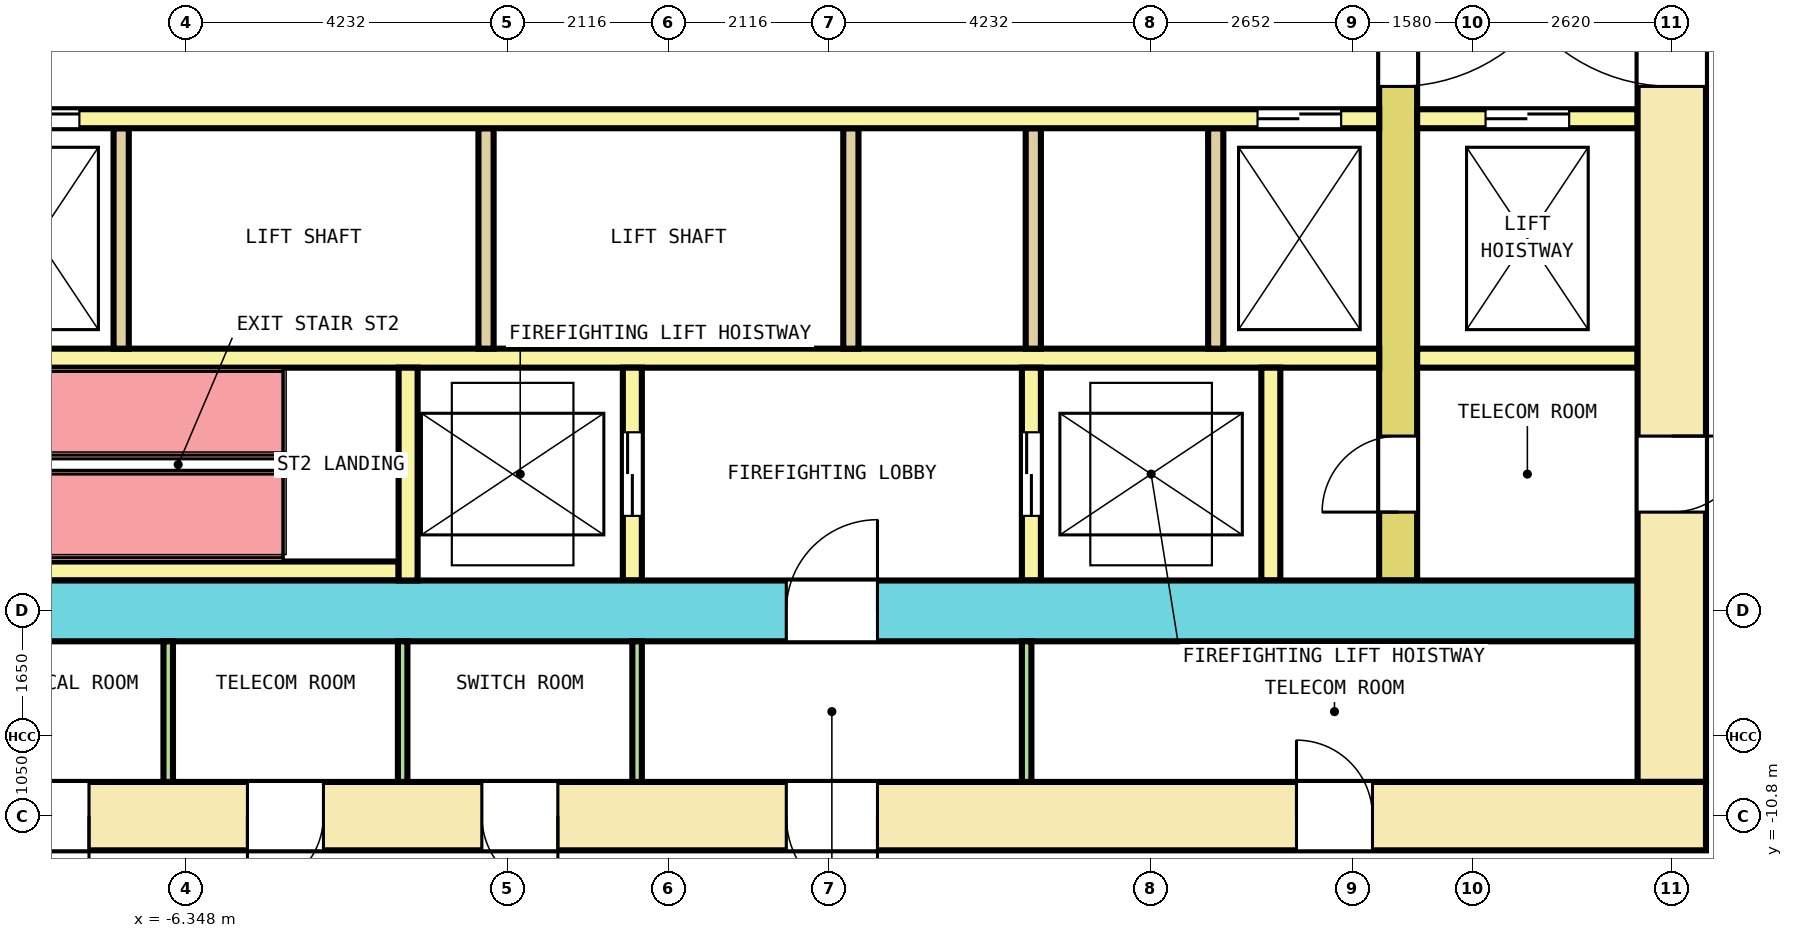
"""IFC4 building model, lengths in metres.
Left out: names, types, materials, properties, quantities, classifications, styles, units other than length and angle.
Written with IfcOpenShell. Run it as: python <this file> out.ifc"""

import sys

from ifc_helpers import new_model, si_unit, direction, frame, frame_2d, origin, place, context, subcontext, project, spatial, rectangle, extrude, element, fill, save


model = new_model("IFC4")
c1 = context("Model", 3, precision=1e-05, world=origin(), true_north=direction((0.0, 1.0)))
c2 = subcontext(c1, "Body", "Model", "MODEL_VIEW")
j1 = project(units=[si_unit("LENGTHUNIT", "METRE"), si_unit("PLANEANGLEUNIT", "RADIAN")], contexts=[c1])
p1 = place(None, origin())
s1 = spatial("IfcSite", under=j1, at=p1, CompositionType="ELEMENT")
p2 = place(p1, origin())
s2 = spatial("IfcBuilding", under=s1, at=p2, CompositionType="ELEMENT")
p3 = place(p2, frame((0.0, 0.0, 45.4)))
s3 = spatial("IfcBuildingStorey", under=s2, at=p3, CompositionType="ELEMENT", Elevation=45.4)
p4 = place(p3, frame((-13.65, -10.8, 0.0), z_axis=(0.0, 0.0, 1.0), x_axis=(1.0, 0.0, 0.0)))
e1 = element("IfcWall", 1, at=p4, inside=s3, PredefinedType="SHEAR", context=c2, shape_type="SweptSolid", body=[
    extrude(rectangle(XDim=27.3, YDim=0.9, at=frame_2d((13.65, 0.0))), origin(), (0.0, 0.0, 1.0), 4.1),
])
p5 = place(p4, frame((1.911, 0.0, 0.0)))
e2 = element("IfcOpeningElement", 2, at=p5, cuts=e1, PredefinedType="OPENING", context=c2, shape_type="SweptSolid", body=[
    extrude(rectangle(XDim=1.0, YDim=2.1, at=frame_2d((0.5, 1.05))), frame((0.0, 0.46, 0.0), z_axis=(0.0, -1.0, 0.0), x_axis=(1.0, 0.0, 0.0)), (0.0, 0.0, 1.0), 0.92),
])
p6 = place(p4, frame((5.027, 0.0, 0.0)))
e3 = element("IfcOpeningElement", 3, at=p6, cuts=e1, PredefinedType="OPENING", context=c2, shape_type="SweptSolid", body=[
    extrude(rectangle(XDim=1.0, YDim=2.1, at=frame_2d((0.5, 1.05))), frame((0.0, 0.46, 0.0), z_axis=(0.0, -1.0, 0.0), x_axis=(1.0, 0.0, 0.0)), (0.0, 0.0, 1.0), 0.92),
])
p7 = place(p4, frame((8.111, 0.0, 0.0)))
e4 = element("IfcOpeningElement", 4, at=p7, cuts=e1, PredefinedType="OPENING", context=c2, shape_type="SweptSolid", body=[
    extrude(rectangle(XDim=1.0, YDim=2.1, at=frame_2d((0.5, 1.05))), frame((0.0, 0.46, 0.0), z_axis=(0.0, -1.0, 0.0), x_axis=(1.0, 0.0, 0.0)), (0.0, 0.0, 1.0), 0.92),
])
p8 = place(p4, frame((11.195, 0.0, 0.0)))
e5 = element("IfcOpeningElement", 5, at=p8, cuts=e1, PredefinedType="OPENING", context=c2, shape_type="SweptSolid", body=[
    extrude(rectangle(XDim=1.0, YDim=2.1, at=frame_2d((0.5, 1.05))), frame((0.0, 0.46, 0.0), z_axis=(0.0, -1.0, 0.0), x_axis=(1.0, 0.0, 0.0)), (0.0, 0.0, 1.0), 0.92),
])
p9 = place(p4, frame((21.913, 0.0, 0.0)))
e6 = element("IfcOpeningElement", 6, at=p9, cuts=e1, PredefinedType="OPENING", context=c2, shape_type="SweptSolid", body=[
    extrude(rectangle(XDim=1.0, YDim=2.1, at=frame_2d((0.5, 1.05))), frame((0.0, 0.46, 0.0), z_axis=(0.0, -1.0, 0.0), x_axis=(1.0, 0.0, 0.0)), (0.0, 0.0, 1.0), 0.92),
])
p10 = place(p4, frame((15.2, 0.0, 0.0)))
e7 = element("IfcOpeningElement", 7, at=p10, cuts=e1, PredefinedType="OPENING", context=c2, shape_type="SweptSolid", body=[
    extrude(rectangle(XDim=1.2, YDim=2.1, at=frame_2d((0.6, 1.05))), frame((0.0, 0.46, 0.0), z_axis=(0.0, -1.0, 0.0), x_axis=(1.0, 0.0, 0.0)), (0.0, 0.0, 1.0), 0.92),
])
p11 = place(p3, frame((13.2, -10.35, 0.0), z_axis=(0.0, 0.0, 1.0), x_axis=(0.0, 1.0, 0.0)))
e8 = element("IfcWall", 8, at=p11, inside=s3, PredefinedType="SHEAR", context=c2, shape_type="SweptSolid", body=[
    extrude(rectangle(XDim=20.7, YDim=0.9, at=frame_2d((10.35, 0.0))), origin(), (0.0, 0.0, 1.0), 4.1),
])
p12 = place(p11, frame((9.15, 0.0, 0.0)))
e9 = element("IfcOpeningElement", 9, at=p12, cuts=e8, PredefinedType="OPENING", context=c2, shape_type="SweptSolid", body=[
    extrude(rectangle(XDim=2.4, YDim=2.1, at=frame_2d((1.2, 1.05))), frame((0.0, 0.46, 0.0), z_axis=(0.0, -1.0, 0.0), x_axis=(1.0, 0.0, 0.0)), (0.0, 0.0, 1.0), 0.92),
])
p13 = place(p11, frame((16.05, 0.0, 0.0)))
e10 = element("IfcOpeningElement", 10, at=p13, cuts=e8, PredefinedType="OPENING", context=c2, shape_type="SweptSolid", body=[
    extrude(rectangle(XDim=1.2, YDim=2.1, at=frame_2d((0.6, 1.05))), frame((0.0, 0.46, 0.0), z_axis=(0.0, -1.0, 0.0), x_axis=(1.0, 0.0, 0.0)), (0.0, 0.0, 1.0), 0.92),
])
p14 = place(p11, frame((3.55, 0.0, 0.0)))
e11 = element("IfcOpeningElement", 11, at=p14, cuts=e8, PredefinedType="OPENING", context=c2, shape_type="SweptSolid", body=[
    extrude(rectangle(XDim=1.0, YDim=2.1, at=frame_2d((0.5, 1.05))), frame((0.0, 0.46, 0.0), z_axis=(0.0, -1.0, 0.0), x_axis=(1.0, 0.0, 0.0)), (0.0, 0.0, 1.0), 0.92),
])
p15 = place(p3, frame((-12.75, -8.1, 0.0), z_axis=(0.0, 0.0, 1.0), x_axis=(1.0, 0.0, 0.0)))
e12 = element("IfcWall", 12, at=p15, inside=s3, PredefinedType="SHEAR", context=c2, shape_type="SweptSolid", body=[
    extrude(rectangle(XDim=25.5, YDim=0.8, at=frame_2d((12.75, 0.0))), origin(), (0.0, 0.0, 1.0), 4.1),
])
p16 = place(p15, frame((14.3, 0.0, 0.0)))
e13 = element("IfcOpeningElement", 13, at=p16, cuts=e12, PredefinedType="OPENING", context=c2, shape_type="SweptSolid", body=[
    extrude(rectangle(XDim=1.2, YDim=2.1, at=frame_2d((0.6, 1.05))), frame((0.0, 0.41, 0.0), z_axis=(0.0, -1.0, 0.0), x_axis=(1.0, 0.0, 0.0)), (0.0, 0.0, 1.0), 0.82),
])
p17 = place(p3, frame((9.6, -7.7, 0.0), z_axis=(0.0, 0.0, 1.0), x_axis=(0.0, 1.0, 0.0)))
e14 = element("IfcWall", 14, at=p17, inside=s3, PredefinedType="SHEAR", context=c2, shape_type="SweptSolid", body=[
    extrude(rectangle(XDim=15.4, YDim=0.5, at=frame_2d((7.7, 0.0))), origin(), (0.0, 0.0, 1.0), 4.1),
])
p18 = place(p17, frame((6.5, 0.0, 0.0)))
e15 = element("IfcOpeningElement", 15, at=p18, cuts=e14, PredefinedType="OPENING", context=c2, shape_type="SweptSolid", body=[
    extrude(rectangle(XDim=2.4, YDim=2.1, at=frame_2d((1.2, 1.05))), frame((0.0, 0.26, 0.0), z_axis=(0.0, -1.0, 0.0), x_axis=(1.0, 0.0, 0.0)), (0.0, 0.0, 1.0), 0.52),
])
p19 = place(p17, frame((13.4, 0.0, 0.0)))
e16 = element("IfcOpeningElement", 16, at=p19, cuts=e14, PredefinedType="OPENING", context=c2, shape_type="SweptSolid", body=[
    extrude(rectangle(XDim=1.2, YDim=2.1, at=frame_2d((0.6, 1.05))), frame((0.0, 0.26, 0.0), z_axis=(0.0, -1.0, 0.0), x_axis=(1.0, 0.0, 0.0)), (0.0, 0.0, 1.0), 0.52),
])
p20 = place(p17, frame((0.9, 0.0, 0.0)))
e17 = element("IfcOpeningElement", 17, at=p20, cuts=e14, PredefinedType="OPENING", context=c2, shape_type="SweptSolid", body=[
    extrude(rectangle(XDim=1.0, YDim=2.1, at=frame_2d((0.5, 1.05))), frame((0.0, 0.26, 0.0), z_axis=(0.0, -1.0, 0.0), x_axis=(1.0, 0.0, 0.0)), (0.0, 0.0, 1.0), 0.52),
])
p21 = place(p3, frame((-9.35, -1.625, 0.0), z_axis=(0.0, 0.0, 1.0), x_axis=(1.0, 0.0, 0.0)))
e18 = element("IfcWall", 18, at=p21, inside=s3, PredefinedType="SOLIDWALL", context=c2, shape_type="SweptSolid", body=[
    extrude(rectangle(XDim=18.7, YDim=0.25, at=frame_2d((9.35, 0.0))), origin(), (0.0, 0.0, 1.0), 4.1),
])
p22 = place(p21, frame((0.5, 0.0, 0.0)))
e19 = element("IfcOpeningElement", 19, at=p22, cuts=e18, PredefinedType="OPENING", context=c2, shape_type="SweptSolid", body=[
    extrude(rectangle(XDim=1.1, YDim=2.1, at=frame_2d((0.55, 1.05))), frame((0.0, 0.135, 0.0), z_axis=(0.0, -1.0, 0.0), x_axis=(1.0, 0.0, 0.0)), (0.0, 0.0, 1.0), 0.27),
])
p23 = place(p21, frame((17.1, 0.0, 0.0)))
e20 = element("IfcOpeningElement", 20, at=p23, cuts=e18, PredefinedType="OPENING", context=c2, shape_type="SweptSolid", body=[
    extrude(rectangle(XDim=1.1, YDim=2.1, at=frame_2d((0.55, 1.05))), frame((0.0, 0.135, 0.0), z_axis=(0.0, -1.0, 0.0), x_axis=(1.0, 0.0, 0.0)), (0.0, 0.0, 1.0), 0.27),
])
p24 = place(p3, frame((9.85, -1.625, 0.0), z_axis=(0.0, 0.0, 1.0), x_axis=(1.0, 0.0, 0.0)))
e21 = element("IfcWall", 21, at=p24, inside=s3, PredefinedType="SOLIDWALL", context=c2, shape_type="SweptSolid", body=[
    extrude(rectangle(XDim=2.9, YDim=0.25, at=frame_2d((1.45, 0.0))), origin(), (0.0, 0.0, 1.0), 4.1),
])
p25 = place(p24, frame((0.9, 0.0, 0.0)))
e22 = element("IfcOpeningElement", 22, at=p25, cuts=e21, PredefinedType="OPENING", context=c2, shape_type="SweptSolid", body=[
    extrude(rectangle(XDim=1.1, YDim=2.1, at=frame_2d((0.55, 1.05))), frame((0.0, 0.135, 0.0), z_axis=(0.0, -1.0, 0.0), x_axis=(1.0, 0.0, 0.0)), (0.0, 0.0, 1.0), 0.27),
])
p26 = place(p3, frame((-9.35, -4.775, 0.0), z_axis=(0.0, 0.0, 1.0), x_axis=(1.0, 0.0, 0.0)))
e23 = element("IfcWall", 23, at=p26, inside=s3, PredefinedType="SOLIDWALL", context=c2, shape_type="SweptSolid", body=[
    extrude(rectangle(XDim=18.7, YDim=0.25, at=frame_2d((9.35, 0.0))), origin(), (0.0, 0.0, 1.0), 4.1),
])
p27 = place(p3, frame((9.85, -4.775, 0.0), z_axis=(0.0, 0.0, 1.0), x_axis=(1.0, 0.0, 0.0)))
e24 = element("IfcWall", 24, at=p27, inside=s3, PredefinedType="SOLIDWALL", context=c2, shape_type="SweptSolid", body=[
    extrude(rectangle(XDim=2.9, YDim=0.25, at=frame_2d((1.45, 0.0))), origin(), (0.0, 0.0, 1.0), 4.1),
])
for number, where, z_axis, x_axis in (
    (25, (-7.2, -4.65, 0.0), (0.0, 0.0, 1.0), (0.0, 1.0, 0.0)),
    (26, (-2.4, -4.65, 0.0), (0.0, 0.0, 1.0), (0.0, 1.0, 0.0)),
    (27, (2.4, -4.65, 0.0), (0.0, 0.0, 1.0), (0.0, 1.0, 0.0)),
    (28, (4.8, -4.65, 0.0), (0.0, 0.0, 1.0), (0.0, 1.0, 0.0)),
    (29, (7.2, -4.65, 0.0), (0.0, 0.0, 1.0), (0.0, 1.0, 0.0)),
):
    element("IfcWall", number, at=place(p3, frame(where, z_axis=z_axis, x_axis=x_axis)), inside=s3, PredefinedType="SOLIDWALL", context=c2, shape_type="SweptSolid", body=[
        extrude(rectangle(XDim=2.9, YDim=0.2, at=frame_2d((1.45, 0.0))), origin(), (0.0, 0.0, 1.0), 4.1),
    ])
p28 = place(p3, frame((-9.35, -7.575, 0.0), z_axis=(0.0, 0.0, 1.0), x_axis=(1.0, 0.0, 0.0)))
e30 = element("IfcWall", 30, at=p28, inside=s3, PredefinedType="SOLIDWALL", context=c2, shape_type="SweptSolid", body=[
    extrude(rectangle(XDim=5.8, YDim=0.25, at=frame_2d((2.9, 0.0))), origin(), (0.0, 0.0, 1.0), 4.1),
])
p29 = place(p3, frame((-3.425, -7.7, 0.0), z_axis=(0.0, 0.0, 1.0), x_axis=(0.0, 1.0, 0.0)))
e31 = element("IfcWall", 31, at=p29, inside=s3, PredefinedType="SOLIDWALL", context=c2, shape_type="SweptSolid", body=[
    extrude(rectangle(XDim=2.8, YDim=0.25, at=frame_2d((1.4, 0.0))), origin(), (0.0, 0.0, 1.0), 4.1),
])
p30 = place(p3, frame((-0.475, -7.7, 0.0), z_axis=(0.0, 0.0, 1.0), x_axis=(0.0, 1.0, 0.0)))
e32 = element("IfcWall", 32, at=p30, inside=s3, PredefinedType="SOLIDWALL", context=c2, shape_type="SweptSolid", body=[
    extrude(rectangle(XDim=2.8, YDim=0.25, at=frame_2d((1.4, 0.0))), origin(), (0.0, 0.0, 1.0), 4.1),
])
p31 = place(p30, frame((0.85, 0.0, 0.0)))
e33 = element("IfcOpeningElement", 33, at=p31, cuts=e32, PredefinedType="OPENING", context=c2, shape_type="SweptSolid", body=[
    extrude(rectangle(XDim=1.1, YDim=2.1, at=frame_2d((0.55, 1.05))), frame((0.0, 0.135, 0.0), z_axis=(0.0, -1.0, 0.0), x_axis=(1.0, 0.0, 0.0)), (0.0, 0.0, 1.0), 0.27),
])
p32 = place(p3, frame((4.775, -7.7, 0.0), z_axis=(0.0, 0.0, 1.0), x_axis=(0.0, 1.0, 0.0)))
e34 = element("IfcWall", 34, at=p32, inside=s3, PredefinedType="SOLIDWALL", context=c2, shape_type="SweptSolid", body=[
    extrude(rectangle(XDim=2.8, YDim=0.25, at=frame_2d((1.4, 0.0))), origin(), (0.0, 0.0, 1.0), 4.1),
])
p33 = place(p32, frame((0.85, 0.0, 0.0)))
e35 = element("IfcOpeningElement", 35, at=p33, cuts=e34, PredefinedType="OPENING", context=c2, shape_type="SweptSolid", body=[
    extrude(rectangle(XDim=1.1, YDim=2.1, at=frame_2d((0.55, 1.05))), frame((0.0, 0.135, 0.0), z_axis=(0.0, -1.0, 0.0), x_axis=(1.0, 0.0, 0.0)), (0.0, 0.0, 1.0), 0.27),
])
p34 = place(p3, frame((7.925, -7.7, 0.0), z_axis=(0.0, 0.0, 1.0), x_axis=(0.0, 1.0, 0.0)))
e36 = element("IfcWall", 36, at=p34, inside=s3, PredefinedType="SOLIDWALL", context=c2, shape_type="SweptSolid", body=[
    extrude(rectangle(XDim=2.8, YDim=0.25, at=frame_2d((1.4, 0.0))), origin(), (0.0, 0.0, 1.0), 4.1),
])
for number, where, z_axis, x_axis in (
    (37, (-6.581, -10.35, 0.0), (0.0, 0.0, 1.0), (0.0, 1.0, 0.0)),
    (38, (-3.497, -10.35, 0.0), (0.0, 0.0, 1.0), (0.0, 1.0, 0.0)),
    (39, (-0.413, -10.35, 0.0), (0.0, 0.0, 1.0), (0.0, 1.0, 0.0)),
    (40, (4.712, -10.35, 0.0), (0.0, 0.0, 1.0), (0.0, 1.0, 0.0)),
):
    element("IfcWall", number, at=place(p3, frame(where, z_axis=z_axis, x_axis=x_axis)), inside=s3, PredefinedType="PARTITIONING", context=c2, shape_type="SweptSolid", body=[
        extrude(rectangle(XDim=1.85, YDim=0.125, at=frame_2d((0.925, 0.0))), origin(), (0.0, 0.0, 1.0), 4.1),
    ])
p35 = place(p22, origin())
e41 = element("IfcDoor", 41, at=p35, inside=s3, OperationType="DOUBLE_DOOR_SLIDING", PredefinedType="DOOR", context=c2, shape_type="SweptSolid", body=[
    extrude(rectangle(XDim=1.1, YDim=2.1, at=frame_2d((0.55, 1.05))), frame((0.0, 0.075, 0.0), z_axis=(0.0, -1.0, 0.0), x_axis=(1.0, 0.0, 0.0)), (0.0, 0.0, 1.0), 0.15),
])
fill(e19, e41)
p36 = place(p23, origin())
e42 = element("IfcDoor", 42, at=p36, inside=s3, OperationType="DOUBLE_DOOR_SLIDING", PredefinedType="DOOR", context=c2, shape_type="SweptSolid", body=[
    extrude(rectangle(XDim=1.1, YDim=2.1, at=frame_2d((0.55, 1.05))), frame((0.0, 0.075, 0.0), z_axis=(0.0, -1.0, 0.0), x_axis=(1.0, 0.0, 0.0)), (0.0, 0.0, 1.0), 0.15),
])
fill(e20, e42)
p37 = place(p25, origin())
e43 = element("IfcDoor", 43, at=p37, inside=s3, OperationType="DOUBLE_DOOR_SLIDING", PredefinedType="DOOR", context=c2, shape_type="SweptSolid", body=[
    extrude(rectangle(XDim=1.1, YDim=2.1, at=frame_2d((0.55, 1.05))), frame((0.0, 0.075, 0.0), z_axis=(0.0, -1.0, 0.0), x_axis=(1.0, 0.0, 0.0)), (0.0, 0.0, 1.0), 0.15),
])
fill(e22, e43)
p38 = place(p31, origin())
e44 = element("IfcDoor", 44, at=p38, inside=s3, OperationType="DOUBLE_DOOR_SLIDING", PredefinedType="DOOR", context=c2, shape_type="SweptSolid", body=[
    extrude(rectangle(XDim=1.1, YDim=2.1, at=frame_2d((0.55, 1.05))), frame((0.0, 0.075, 0.0), z_axis=(0.0, -1.0, 0.0), x_axis=(1.0, 0.0, 0.0)), (0.0, 0.0, 1.0), 0.15),
])
fill(e33, e44)
p39 = place(p33, origin())
e45 = element("IfcDoor", 45, at=p39, inside=s3, OperationType="DOUBLE_DOOR_SLIDING", PredefinedType="DOOR", context=c2, shape_type="SweptSolid", body=[
    extrude(rectangle(XDim=1.1, YDim=2.1, at=frame_2d((0.55, 1.05))), frame((0.0, 0.075, 0.0), z_axis=(0.0, -1.0, 0.0), x_axis=(1.0, 0.0, 0.0)), (0.0, 0.0, 1.0), 0.15),
])
fill(e35, e45)
p40 = place(p18, origin())
e46 = element("IfcDoor", 46, at=p40, inside=s3, OperationType="DOUBLE_DOOR_SINGLE_SWING", PredefinedType="DOOR", context=c2, shape_type="SweptSolid", body=[
    extrude(rectangle(XDim=2.4, YDim=2.1, at=frame_2d((1.2, 1.05))), frame((0.0, 0.2, 0.0), z_axis=(0.0, -1.0, 0.0), x_axis=(1.0, 0.0, 0.0)), (0.0, 0.0, 1.0), 0.4),
])
fill(e15, e46)
p41 = place(p12, origin())
e47 = element("IfcDoor", 47, at=p41, inside=s3, OperationType="DOUBLE_DOOR_SINGLE_SWING", PredefinedType="DOOR", context=c2, shape_type="SweptSolid", body=[
    extrude(rectangle(XDim=2.4, YDim=2.1, at=frame_2d((1.2, 1.05))), frame((0.0, 0.3, 0.0), z_axis=(0.0, -1.0, 0.0), x_axis=(1.0, 0.0, 0.0)), (0.0, 0.0, 1.0), 0.6),
])
fill(e9, e47)
p42 = place(p16, origin())
e48 = element("IfcDoor", 48, at=p42, inside=s3, OperationType="SINGLE_SWING_LEFT", PredefinedType="DOOR", context=c2, shape_type="SweptSolid", body=[
    extrude(rectangle(XDim=1.2, YDim=2.1, at=frame_2d((0.6, 1.05))), frame((0.0, 0.3, 0.0), z_axis=(0.0, -1.0, 0.0), x_axis=(1.0, 0.0, 0.0)), (0.0, 0.0, 1.0), 0.6),
])
fill(e13, e48)
p43 = place(p20, origin())
e49 = element("IfcDoor", 49, at=p43, inside=s3, OperationType="SINGLE_SWING_LEFT", PredefinedType="DOOR", context=c2, shape_type="SweptSolid", body=[
    extrude(rectangle(XDim=1.0, YDim=2.1, at=frame_2d((0.5, 1.05))), frame((0.0, 0.2, 0.0), z_axis=(0.0, -1.0, 0.0), x_axis=(1.0, 0.0, 0.0)), (0.0, 0.0, 1.0), 0.4),
])
fill(e17, e49)
p44 = place(p14, origin())
e50 = element("IfcDoor", 50, at=p44, inside=s3, OperationType="SINGLE_SWING_RIGHT", PredefinedType="DOOR", context=c2, shape_type="SweptSolid", body=[
    extrude(rectangle(XDim=1.0, YDim=2.1, at=frame_2d((0.5, 1.05))), frame((0.0, 0.3, 0.0), z_axis=(0.0, -1.0, 0.0), x_axis=(1.0, 0.0, 0.0)), (0.0, 0.0, 1.0), 0.6),
])
fill(e11, e50)
p45 = place(p6, origin())
e51 = element("IfcDoor", 51, at=p45, inside=s3, OperationType="SINGLE_SWING_LEFT", PredefinedType="DOOR", context=c2, shape_type="SweptSolid", body=[
    extrude(rectangle(XDim=1.0, YDim=2.1, at=frame_2d((0.5, 1.05))), frame((0.0, 0.3, 0.0), z_axis=(0.0, -1.0, 0.0), x_axis=(1.0, 0.0, 0.0)), (0.0, 0.0, 1.0), 0.6),
])
fill(e3, e51)
p46 = place(p7, origin())
e52 = element("IfcDoor", 52, at=p46, inside=s3, OperationType="SINGLE_SWING_RIGHT", PredefinedType="DOOR", context=c2, shape_type="SweptSolid", body=[
    extrude(rectangle(XDim=1.0, YDim=2.1, at=frame_2d((0.5, 1.05))), frame((0.0, 0.3, 0.0), z_axis=(0.0, -1.0, 0.0), x_axis=(1.0, 0.0, 0.0)), (0.0, 0.0, 1.0), 0.6),
])
fill(e4, e52)
p47 = place(p8, origin())
e53 = element("IfcDoor", 53, at=p47, inside=s3, OperationType="SINGLE_SWING_LEFT", PredefinedType="DOOR", context=c2, shape_type="SweptSolid", body=[
    extrude(rectangle(XDim=1.0, YDim=2.1, at=frame_2d((0.5, 1.05))), frame((0.0, 0.3, 0.0), z_axis=(0.0, -1.0, 0.0), x_axis=(1.0, 0.0, 0.0)), (0.0, 0.0, 1.0), 0.6),
])
fill(e5, e53)
p48 = place(p9, origin())
e54 = element("IfcDoor", 54, at=p48, inside=s3, OperationType="SINGLE_SWING_RIGHT", PredefinedType="DOOR", context=c2, shape_type="SweptSolid", body=[
    extrude(rectangle(XDim=1.0, YDim=2.1, at=frame_2d((0.5, 1.05))), frame((0.0, 0.3, 0.0), z_axis=(0.0, -1.0, 0.0), x_axis=(1.0, 0.0, 0.0)), (0.0, 0.0, 1.0), 0.6),
])
fill(e6, e54)
p49 = place(p10, origin())
e55 = element("IfcDoor", 55, at=p49, inside=s3, OperationType="SINGLE_SWING_LEFT", PredefinedType="DOOR", context=c2, shape_type="SweptSolid", body=[
    extrude(rectangle(XDim=1.2, YDim=2.1, at=frame_2d((0.6, 1.05))), frame((0.0, 0.3, 0.0), z_axis=(0.0, -1.0, 0.0), x_axis=(1.0, 0.0, 0.0)), (0.0, 0.0, 1.0), 0.6),
])
fill(e7, e55)
save(model, sys.argv[1])
